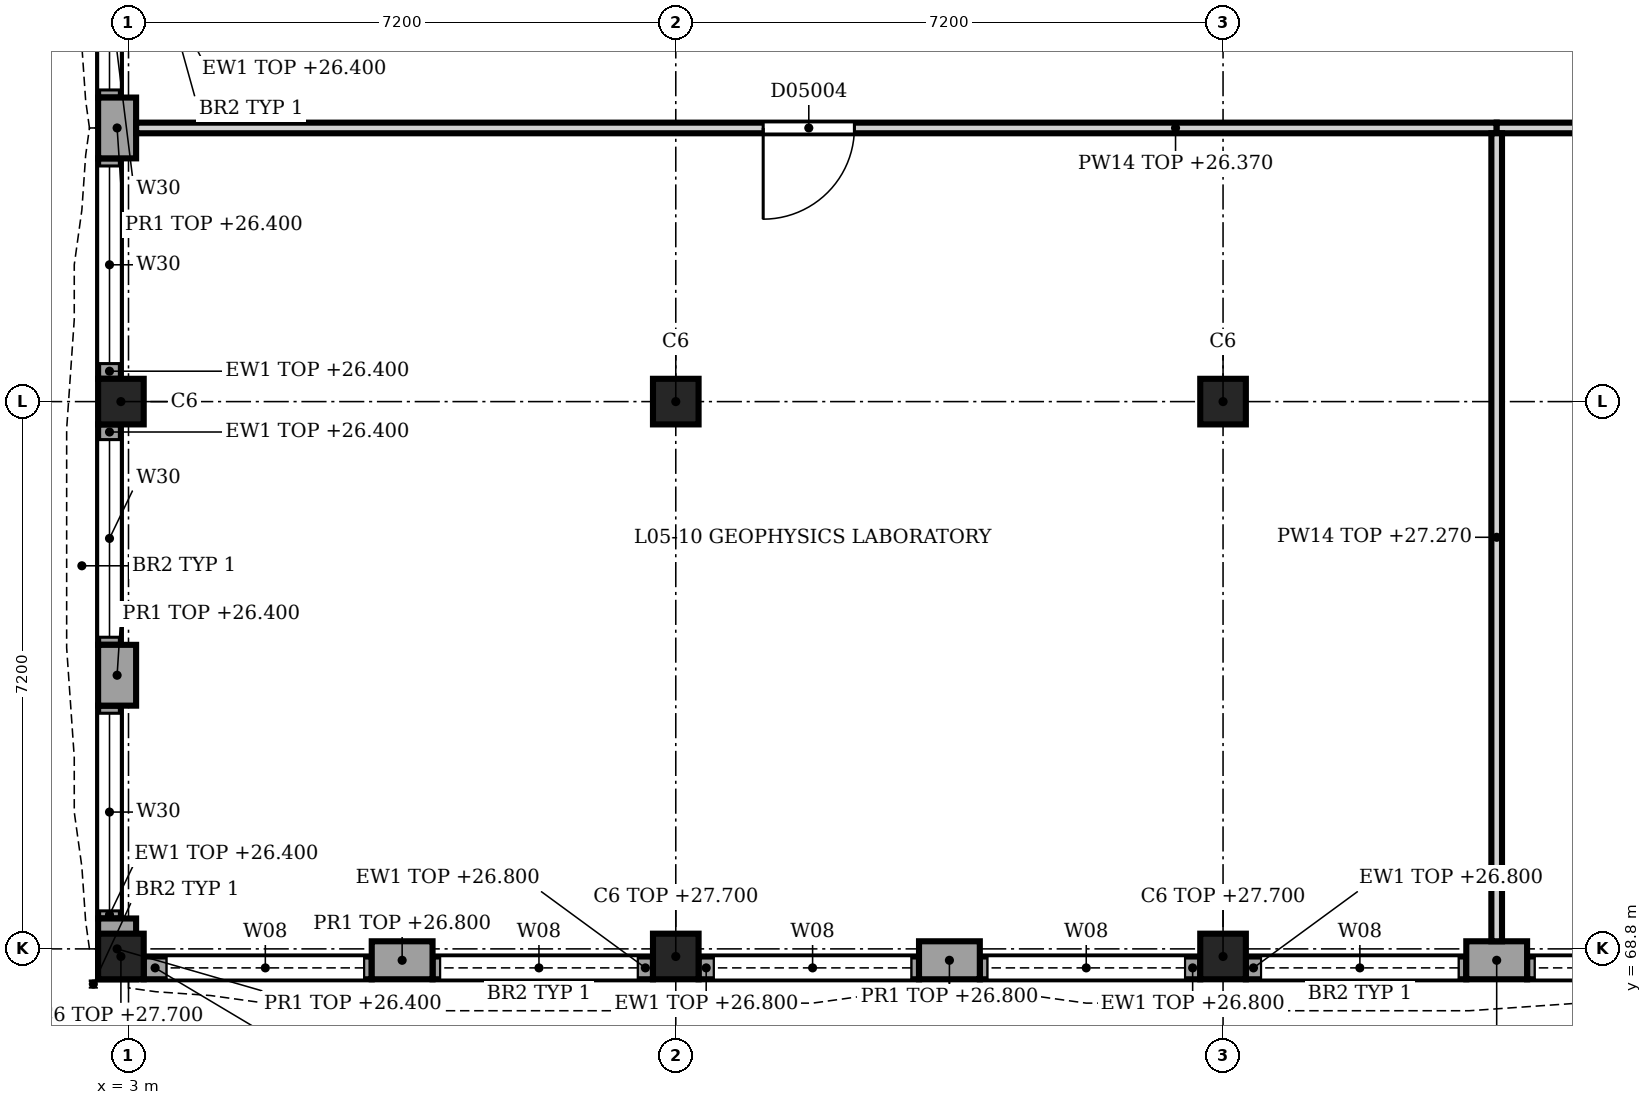
"""IFC4 building model, lengths in metres.
Left out: names, types, materials, properties, quantities, classifications, styles, units other than length and angle.
Written with IfcOpenShell. Run it as: python <this file> out.ifc"""

import sys

from ifc_helpers import new_model, si_unit, direction, frame, frame_2d, origin, origin_2d, place, context, subcontext, project, spatial, rectangle, extrude, element, fill, save


model = new_model("IFC4")
c1 = context("Model", 3, precision=1e-05, world=origin(), true_north=direction((0.0, 1.0)))
c2 = subcontext(c1, "Body", "Model", "MODEL_VIEW")
j1 = project(units=[si_unit("LENGTHUNIT", "METRE"), si_unit("PLANEANGLEUNIT", "RADIAN")], contexts=[c1])
p1 = place(None, origin())
s1 = spatial("IfcSite", under=j1, at=p1, CompositionType="ELEMENT")
p2 = place(p1, origin())
s2 = spatial("IfcBuilding", under=s1, at=p2, CompositionType="ELEMENT")
p3 = place(p2, frame((0.0, 0.0, 23.4)))
s3 = spatial("IfcBuildingStorey", under=s2, at=p3, CompositionType="ELEMENT", Elevation=23.4)
p4 = place(p3, frame((2.9, 68.7, 0.0), z_axis=(0.0, 0.0, 1.0), x_axis=(1.0, 0.0, 0.0)))
e1 = element("IfcColumn", 1, at=p4, inside=s3, PredefinedType="COLUMN", context=c2, shape_type="SweptSolid", body=[
    extrude(rectangle(XDim=0.6, YDim=0.6, at=origin_2d()), origin(), (0.0, 0.0, 1.0), 4.3),
])
p5 = place(p3, frame((2.9, 76.0, 0.0), z_axis=(0.0, 0.0, 1.0), x_axis=(1.0, 0.0, 0.0)))
e2 = element("IfcColumn", 2, at=p5, inside=s3, PredefinedType="COLUMN", context=c2, shape_type="SweptSolid", body=[
    extrude(rectangle(XDim=0.6, YDim=0.6, at=origin_2d()), origin(), (0.0, 0.0, 1.0), 4.5),
])
p6 = place(p3, frame((10.2, 68.7, 0.0), z_axis=(0.0, 0.0, 1.0), x_axis=(1.0, 0.0, 0.0)))
e3 = element("IfcColumn", 3, at=p6, inside=s3, PredefinedType="COLUMN", context=c2, shape_type="SweptSolid", body=[
    extrude(rectangle(XDim=0.6, YDim=0.6, at=origin_2d()), origin(), (0.0, 0.0, 1.0), 4.3),
])
p7 = place(p3, frame((10.2, 76.0, 0.0), z_axis=(0.0, 0.0, 1.0), x_axis=(1.0, 0.0, 0.0)))
e4 = element("IfcColumn", 4, at=p7, inside=s3, PredefinedType="COLUMN", context=c2, shape_type="SweptSolid", body=[
    extrude(rectangle(XDim=0.6, YDim=0.6, at=origin_2d()), origin(), (0.0, 0.0, 1.0), 4.5),
])
p8 = place(p3, frame((17.4, 68.7, 0.0), z_axis=(0.0, 0.0, 1.0), x_axis=(1.0, 0.0, 0.0)))
e5 = element("IfcColumn", 5, at=p8, inside=s3, PredefinedType="COLUMN", context=c2, shape_type="SweptSolid", body=[
    extrude(rectangle(XDim=0.6, YDim=0.6, at=origin_2d()), origin(), (0.0, 0.0, 1.0), 4.3),
])
p9 = place(p3, frame((17.4, 76.0, 0.0), z_axis=(0.0, 0.0, 1.0), x_axis=(1.0, 0.0, 0.0)))
e6 = element("IfcColumn", 6, at=p9, inside=s3, PredefinedType="COLUMN", context=c2, shape_type="SweptSolid", body=[
    extrude(rectangle(XDim=0.6, YDim=0.6, at=origin_2d()), origin(), (0.0, 0.0, 1.0), 4.5),
])
p10 = place(p3, frame((21.4, 68.65, 0.0), z_axis=(0.0, 0.0, 1.0), x_axis=(-1.0, 0.0, 0.0)))
e7 = element("IfcWall", 7, at=p10, inside=s3, PredefinedType="SOLIDWALL", context=c2, shape_type="SweptSolid", body=[
    extrude(rectangle(XDim=0.8, YDim=0.5, at=frame_2d((0.4, 0.0))), origin(), (0.0, 0.0, 1.0), 3.4),
])
for number, where, z_axis, x_axis in (
    (8, (14.2, 68.65, 0.0), (0.0, 0.0, 1.0), (-1.0, 0.0, 0.0)),
    (9, (7.0, 68.65, 0.0), (0.0, 0.0, 1.0), (-1.0, 0.0, 0.0)),
):
    element("IfcWall", number, at=place(p3, frame(where, z_axis=z_axis, x_axis=x_axis)), inside=s3, PredefinedType="SOLIDWALL", context=c2, shape_type="SweptSolid", body=[
        extrude(rectangle(XDim=0.8, YDim=0.5, at=frame_2d((0.4, 0.0))), origin(), (0.0, 0.0, 1.0), 3.4),
    ])
p11 = place(p3, frame((24.3, 68.55, 0.0), z_axis=(0.0, 0.0, 1.0), x_axis=(-1.0, 0.0, 0.0)))
e10 = element("IfcWall", 10, at=p11, inside=s3, PredefinedType="SOLIDWALL", context=c2, shape_type="SweptSolid", body=[
    extrude(rectangle(XDim=2.9, YDim=0.3, at=frame_2d((1.45, 0.0))), origin(), (0.0, 0.0, 1.0), 3.4),
])
p12 = place(p11, frame((0.2, 0.0, 1.2)))
e11 = element("IfcOpeningElement", 11, at=p12, cuts=e10, PredefinedType="OPENING", context=c2, shape_type="SweptSolid", body=[
    extrude(rectangle(XDim=2.6, YDim=2.1, at=frame_2d((1.3, 1.05))), frame((0.0, 0.16, 0.0), z_axis=(0.0, -1.0, 0.0), x_axis=(1.0, 0.0, 0.0)), (0.0, 0.0, 1.0), 0.32),
])
p13 = place(p3, frame((20.6, 68.55, 0.0), z_axis=(0.0, 0.0, 1.0), x_axis=(-1.0, 0.0, 0.0)))
e12 = element("IfcWall", 12, at=p13, inside=s3, PredefinedType="SOLIDWALL", context=c2, shape_type="SweptSolid", body=[
    extrude(rectangle(XDim=2.9, YDim=0.3, at=frame_2d((1.45, 0.0))), origin(), (0.0, 0.0, 1.0), 3.4),
])
p14 = place(p13, frame((0.1, 0.0, 1.2)))
e13 = element("IfcOpeningElement", 13, at=p14, cuts=e12, PredefinedType="OPENING", context=c2, shape_type="SweptSolid", body=[
    extrude(rectangle(XDim=2.6, YDim=2.1, at=frame_2d((1.3, 1.05))), frame((0.0, 0.16, 0.0), z_axis=(0.0, -1.0, 0.0), x_axis=(1.0, 0.0, 0.0)), (0.0, 0.0, 1.0), 0.32),
])
p15 = place(p3, frame((17.1, 68.55, 0.0), z_axis=(0.0, 0.0, 1.0), x_axis=(-1.0, 0.0, 0.0)))
e14 = element("IfcWall", 14, at=p15, inside=s3, PredefinedType="SOLIDWALL", context=c2, shape_type="SweptSolid", body=[
    extrude(rectangle(XDim=2.9, YDim=0.3, at=frame_2d((1.45, 0.0))), origin(), (0.0, 0.0, 1.0), 3.4),
])
p16 = place(p15, frame((0.2, 0.0, 1.2)))
e15 = element("IfcOpeningElement", 15, at=p16, cuts=e14, PredefinedType="OPENING", context=c2, shape_type="SweptSolid", body=[
    extrude(rectangle(XDim=2.6, YDim=2.1, at=frame_2d((1.3, 1.05))), frame((0.0, 0.16, 0.0), z_axis=(0.0, -1.0, 0.0), x_axis=(1.0, 0.0, 0.0)), (0.0, 0.0, 1.0), 0.32),
])
p17 = place(p3, frame((13.4, 68.55, 0.0), z_axis=(0.0, 0.0, 1.0), x_axis=(-1.0, 0.0, 0.0)))
e16 = element("IfcWall", 16, at=p17, inside=s3, PredefinedType="SOLIDWALL", context=c2, shape_type="SweptSolid", body=[
    extrude(rectangle(XDim=2.9, YDim=0.3, at=frame_2d((1.45, 0.0))), origin(), (0.0, 0.0, 1.0), 3.4),
])
p18 = place(p17, frame((0.1, 0.0, 1.2)))
e17 = element("IfcOpeningElement", 17, at=p18, cuts=e16, PredefinedType="OPENING", context=c2, shape_type="SweptSolid", body=[
    extrude(rectangle(XDim=2.6, YDim=2.1, at=frame_2d((1.3, 1.05))), frame((0.0, 0.16, 0.0), z_axis=(0.0, -1.0, 0.0), x_axis=(1.0, 0.0, 0.0)), (0.0, 0.0, 1.0), 0.32),
])
p19 = place(p3, frame((9.9, 68.55, 0.0), z_axis=(0.0, 0.0, 1.0), x_axis=(-1.0, 0.0, 0.0)))
e18 = element("IfcWall", 18, at=p19, inside=s3, PredefinedType="SOLIDWALL", context=c2, shape_type="SweptSolid", body=[
    extrude(rectangle(XDim=2.9, YDim=0.3, at=frame_2d((1.45, 0.0))), origin(), (0.0, 0.0, 1.0), 3.4),
])
p20 = place(p19, frame((0.2, 0.0, 1.2)))
e19 = element("IfcOpeningElement", 19, at=p20, cuts=e18, PredefinedType="OPENING", context=c2, shape_type="SweptSolid", body=[
    extrude(rectangle(XDim=2.6, YDim=2.1, at=frame_2d((1.3, 1.05))), frame((0.0, 0.16, 0.0), z_axis=(0.0, -1.0, 0.0), x_axis=(1.0, 0.0, 0.0)), (0.0, 0.0, 1.0), 0.32),
])
p21 = place(p3, frame((6.2, 68.55, 0.0), z_axis=(0.0, 0.0, 1.0), x_axis=(-1.0, 0.0, 0.0)))
e20 = element("IfcWall", 20, at=p21, inside=s3, PredefinedType="SOLIDWALL", context=c2, shape_type="SweptSolid", body=[
    extrude(rectangle(XDim=3.0, YDim=0.3, at=frame_2d((1.5, 0.0))), origin(), (0.0, 0.0, 1.0), 3.4),
])
p22 = place(p21, frame((0.1, 0.0, 1.2)))
e21 = element("IfcOpeningElement", 21, at=p22, cuts=e20, PredefinedType="OPENING", context=c2, shape_type="SweptSolid", body=[
    extrude(rectangle(XDim=2.6, YDim=2.1, at=frame_2d((1.3, 1.05))), frame((0.0, 0.16, 0.0), z_axis=(0.0, -1.0, 0.0), x_axis=(1.0, 0.0, 0.0)), (0.0, 0.0, 1.0), 0.32),
])
for number, where, z_axis, x_axis in (
    (22, (2.85, 68.4, 0.0), (0.0, 0.0, 1.0), (0.0, 1.0, 0.0)),
    (23, (2.85, 72.0, 0.0), (0.0, 0.0, 1.0), (0.0, 1.0, 0.0)),
    (24, (2.85, 79.2, 0.0), (0.0, 0.0, 1.0), (0.0, 1.0, 0.0)),
):
    element("IfcWall", number, at=place(p3, frame(where, z_axis=z_axis, x_axis=x_axis)), inside=s3, PredefinedType="SOLIDWALL", context=c2, shape_type="SweptSolid", body=[
        extrude(rectangle(XDim=0.8, YDim=0.5, at=frame_2d((0.4, 0.0))), origin(), (0.0, 0.0, 1.0), 3.0),
    ])
p23 = place(p3, frame((2.75, 69.2, 0.0), z_axis=(0.0, 0.0, 1.0), x_axis=(0.0, 1.0, 0.0)))
e25 = element("IfcWall", 25, at=p23, inside=s3, PredefinedType="SOLIDWALL", context=c2, shape_type="SweptSolid", body=[
    extrude(rectangle(XDim=2.8, YDim=0.3, at=frame_2d((1.4, 0.0))), origin(), (0.0, 0.0, 1.0), 3.0),
])
p24 = place(p23, frame((0.1, 0.0, 0.9)))
e26 = element("IfcOpeningElement", 26, at=p24, cuts=e25, PredefinedType="OPENING", context=c2, shape_type="SweptSolid", body=[
    extrude(rectangle(XDim=2.6, YDim=1.9, at=frame_2d((1.3, 0.95))), frame((0.0, 0.16, 0.0), z_axis=(0.0, -1.0, 0.0), x_axis=(1.0, 0.0, 0.0)), (0.0, 0.0, 1.0), 0.32),
])
p25 = place(p3, frame((2.75, 72.8, 0.0), z_axis=(0.0, 0.0, 1.0), x_axis=(0.0, 1.0, 0.0)))
e27 = element("IfcWall", 27, at=p25, inside=s3, PredefinedType="SOLIDWALL", context=c2, shape_type="SweptSolid", body=[
    extrude(rectangle(XDim=2.9, YDim=0.3, at=frame_2d((1.45, 0.0))), origin(), (0.0, 0.0, 1.0), 3.0),
])
p26 = place(p25, frame((0.1, 0.0, 0.9)))
e28 = element("IfcOpeningElement", 28, at=p26, cuts=e27, PredefinedType="OPENING", context=c2, shape_type="SweptSolid", body=[
    extrude(rectangle(XDim=2.6, YDim=1.9, at=frame_2d((1.3, 0.95))), frame((0.0, 0.16, 0.0), z_axis=(0.0, -1.0, 0.0), x_axis=(1.0, 0.0, 0.0)), (0.0, 0.0, 1.0), 0.32),
])
p27 = place(p3, frame((2.75, 76.3, 0.0), z_axis=(0.0, 0.0, 1.0), x_axis=(0.0, 1.0, 0.0)))
e29 = element("IfcWall", 29, at=p27, inside=s3, PredefinedType="SOLIDWALL", context=c2, shape_type="SweptSolid", body=[
    extrude(rectangle(XDim=2.9, YDim=0.3, at=frame_2d((1.45, 0.0))), origin(), (0.0, 0.0, 1.0), 3.0),
])
p28 = place(p27, frame((0.2, 0.0, 0.9)))
e30 = element("IfcOpeningElement", 30, at=p28, cuts=e29, PredefinedType="OPENING", context=c2, shape_type="SweptSolid", body=[
    extrude(rectangle(XDim=2.6, YDim=1.9, at=frame_2d((1.3, 0.95))), frame((0.0, 0.16, 0.0), z_axis=(0.0, -1.0, 0.0), x_axis=(1.0, 0.0, 0.0)), (0.0, 0.0, 1.0), 0.32),
])
p29 = place(p3, frame((2.75, 80.0, 0.0), z_axis=(0.0, 0.0, 1.0), x_axis=(0.0, 1.0, 0.0)))
e31 = element("IfcWall", 31, at=p29, inside=s3, PredefinedType="SOLIDWALL", context=c2, shape_type="SweptSolid", body=[
    extrude(rectangle(XDim=2.9, YDim=0.3, at=frame_2d((1.45, 0.0))), origin(), (0.0, 0.0, 1.0), 3.0),
])
p30 = place(p29, frame((0.1, 0.0, 0.9)))
e32 = element("IfcOpeningElement", 32, at=p30, cuts=e31, PredefinedType="OPENING", context=c2, shape_type="SweptSolid", body=[
    extrude(rectangle(XDim=2.6, YDim=1.9, at=frame_2d((1.3, 0.95))), frame((0.0, 0.16, 0.0), z_axis=(0.0, -1.0, 0.0), x_axis=(1.0, 0.0, 0.0)), (0.0, 0.0, 1.0), 0.32),
])
p31 = place(p3, frame((21.0, 79.6, 0.0), z_axis=(0.0, 0.0, 1.0), x_axis=(-1.0, 0.0, 0.0)))
e33 = element("IfcWall", 33, at=p31, inside=s3, PredefinedType="PARTITIONING", context=c2, shape_type="SweptSolid", body=[
    extrude(rectangle(XDim=17.9, YDim=0.14, at=frame_2d((8.95, 0.0))), origin(), (0.0, 0.0, 1.0), 2.97),
])
p32 = place(p31, frame((8.45, 0.0, 0.0)))
e34 = element("IfcOpeningElement", 34, at=p32, cuts=e33, PredefinedType="OPENING", context=c2, shape_type="SweptSolid", body=[
    extrude(rectangle(XDim=1.2, YDim=2.1, at=frame_2d((0.6, 1.05))), frame((0.0, 0.08, 0.0), z_axis=(0.0, -1.0, 0.0), x_axis=(1.0, 0.0, 0.0)), (0.0, 0.0, 1.0), 0.16),
])
p33 = place(p3, frame((39.0, 79.6, 0.0), z_axis=(0.0, 0.0, 1.0), x_axis=(-1.0, 0.0, 0.0)))
e35 = element("IfcWall", 35, at=p33, inside=s3, PredefinedType="PARTITIONING", context=c2, shape_type="SweptSolid", body=[
    extrude(rectangle(XDim=18.0, YDim=0.14, at=frame_2d((9.0, 0.0))), origin(), (0.0, 0.0, 1.0), 2.97),
])
p34 = place(p33, frame((8.45, 0.0, 0.0)))
e36 = element("IfcOpeningElement", 36, at=p34, cuts=e35, PredefinedType="OPENING", context=c2, shape_type="SweptSolid", body=[
    extrude(rectangle(XDim=1.2, YDim=2.1, at=frame_2d((0.6, 1.05))), frame((0.0, 0.08, 0.0), z_axis=(0.0, -1.0, 0.0), x_axis=(1.0, 0.0, 0.0)), (0.0, 0.0, 1.0), 0.16),
])
p35 = place(p3, frame((21.0, 68.9, 0.0), z_axis=(0.0, 0.0, 1.0), x_axis=(0.0, 1.0, 0.0)))
e37 = element("IfcWall", 37, at=p35, inside=s3, PredefinedType="PARTITIONING", context=c2, shape_type="SweptSolid", body=[
    extrude(rectangle(XDim=10.63, YDim=0.14, at=frame_2d((5.315, 0.0))), origin(), (0.0, 0.0, 1.0), 3.87),
])
p36 = place(p12, origin())
e38 = element("IfcWindow", 38, at=p36, inside=s3, PartitioningType="SINGLE_PANEL", PredefinedType="WINDOW", context=c2, shape_type="SweptSolid", body=[
    extrude(rectangle(XDim=2.6, YDim=2.1, at=frame_2d((1.3, 1.05))), frame((0.0, 0.03, 0.0), z_axis=(0.0, -1.0, 0.0), x_axis=(1.0, 0.0, 0.0)), (0.0, 0.0, 1.0), 0.06),
])
fill(e11, e38)
p37 = place(p14, origin())
e39 = element("IfcWindow", 39, at=p37, inside=s3, PartitioningType="SINGLE_PANEL", PredefinedType="WINDOW", context=c2, shape_type="SweptSolid", body=[
    extrude(rectangle(XDim=2.6, YDim=2.1, at=frame_2d((1.3, 1.05))), frame((0.0, 0.03, 0.0), z_axis=(0.0, -1.0, 0.0), x_axis=(1.0, 0.0, 0.0)), (0.0, 0.0, 1.0), 0.06),
])
fill(e13, e39)
p38 = place(p16, origin())
e40 = element("IfcWindow", 40, at=p38, inside=s3, PartitioningType="SINGLE_PANEL", PredefinedType="WINDOW", context=c2, shape_type="SweptSolid", body=[
    extrude(rectangle(XDim=2.6, YDim=2.1, at=frame_2d((1.3, 1.05))), frame((0.0, 0.03, 0.0), z_axis=(0.0, -1.0, 0.0), x_axis=(1.0, 0.0, 0.0)), (0.0, 0.0, 1.0), 0.06),
])
fill(e15, e40)
p39 = place(p18, origin())
e41 = element("IfcWindow", 41, at=p39, inside=s3, PartitioningType="SINGLE_PANEL", PredefinedType="WINDOW", context=c2, shape_type="SweptSolid", body=[
    extrude(rectangle(XDim=2.6, YDim=2.1, at=frame_2d((1.3, 1.05))), frame((0.0, 0.03, 0.0), z_axis=(0.0, -1.0, 0.0), x_axis=(1.0, 0.0, 0.0)), (0.0, 0.0, 1.0), 0.06),
])
fill(e17, e41)
p40 = place(p20, origin())
e42 = element("IfcWindow", 42, at=p40, inside=s3, PartitioningType="SINGLE_PANEL", PredefinedType="WINDOW", context=c2, shape_type="SweptSolid", body=[
    extrude(rectangle(XDim=2.6, YDim=2.1, at=frame_2d((1.3, 1.05))), frame((0.0, 0.03, 0.0), z_axis=(0.0, -1.0, 0.0), x_axis=(1.0, 0.0, 0.0)), (0.0, 0.0, 1.0), 0.06),
])
fill(e19, e42)
p41 = place(p22, origin())
e43 = element("IfcWindow", 43, at=p41, inside=s3, PartitioningType="SINGLE_PANEL", PredefinedType="WINDOW", context=c2, shape_type="SweptSolid", body=[
    extrude(rectangle(XDim=2.6, YDim=2.1, at=frame_2d((1.3, 1.05))), frame((0.0, 0.03, 0.0), z_axis=(0.0, -1.0, 0.0), x_axis=(1.0, 0.0, 0.0)), (0.0, 0.0, 1.0), 0.06),
])
fill(e21, e43)
p42 = place(p24, origin())
e44 = element("IfcWindow", 44, at=p42, inside=s3, PartitioningType="SINGLE_PANEL", PredefinedType="WINDOW", context=c2, shape_type="SweptSolid", body=[
    extrude(rectangle(XDim=2.6, YDim=1.9, at=frame_2d((1.3, 0.95))), frame((0.0, 0.03, 0.0), z_axis=(0.0, -1.0, 0.0), x_axis=(1.0, 0.0, 0.0)), (0.0, 0.0, 1.0), 0.06),
])
fill(e26, e44)
p43 = place(p26, origin())
e45 = element("IfcWindow", 45, at=p43, inside=s3, PartitioningType="SINGLE_PANEL", PredefinedType="WINDOW", context=c2, shape_type="SweptSolid", body=[
    extrude(rectangle(XDim=2.6, YDim=1.9, at=frame_2d((1.3, 0.95))), frame((0.0, 0.03, 0.0), z_axis=(0.0, -1.0, 0.0), x_axis=(1.0, 0.0, 0.0)), (0.0, 0.0, 1.0), 0.06),
])
fill(e28, e45)
p44 = place(p28, origin())
e46 = element("IfcWindow", 46, at=p44, inside=s3, PartitioningType="SINGLE_PANEL", PredefinedType="WINDOW", context=c2, shape_type="SweptSolid", body=[
    extrude(rectangle(XDim=2.6, YDim=1.9, at=frame_2d((1.3, 0.95))), frame((0.0, 0.03, 0.0), z_axis=(0.0, -1.0, 0.0), x_axis=(1.0, 0.0, 0.0)), (0.0, 0.0, 1.0), 0.06),
])
fill(e30, e46)
p45 = place(p30, origin())
e47 = element("IfcWindow", 47, at=p45, inside=s3, PartitioningType="SINGLE_PANEL", PredefinedType="WINDOW", context=c2, shape_type="SweptSolid", body=[
    extrude(rectangle(XDim=2.6, YDim=1.9, at=frame_2d((1.3, 0.95))), frame((0.0, 0.03, 0.0), z_axis=(0.0, -1.0, 0.0), x_axis=(1.0, 0.0, 0.0)), (0.0, 0.0, 1.0), 0.06),
])
fill(e32, e47)
p46 = place(p32, origin())
e48 = element("IfcDoor", 48, at=p46, inside=s3, OperationType="SINGLE_SWING_RIGHT", PredefinedType="DOOR", context=c2, shape_type="SweptSolid", body=[
    extrude(rectangle(XDim=1.2, YDim=2.1, at=frame_2d((0.6, 1.05))), frame((0.0, 0.025, 0.0), z_axis=(0.0, -1.0, 0.0), x_axis=(1.0, 0.0, 0.0)), (0.0, 0.0, 1.0), 0.05),
])
fill(e34, e48)
save(model, sys.argv[1])
